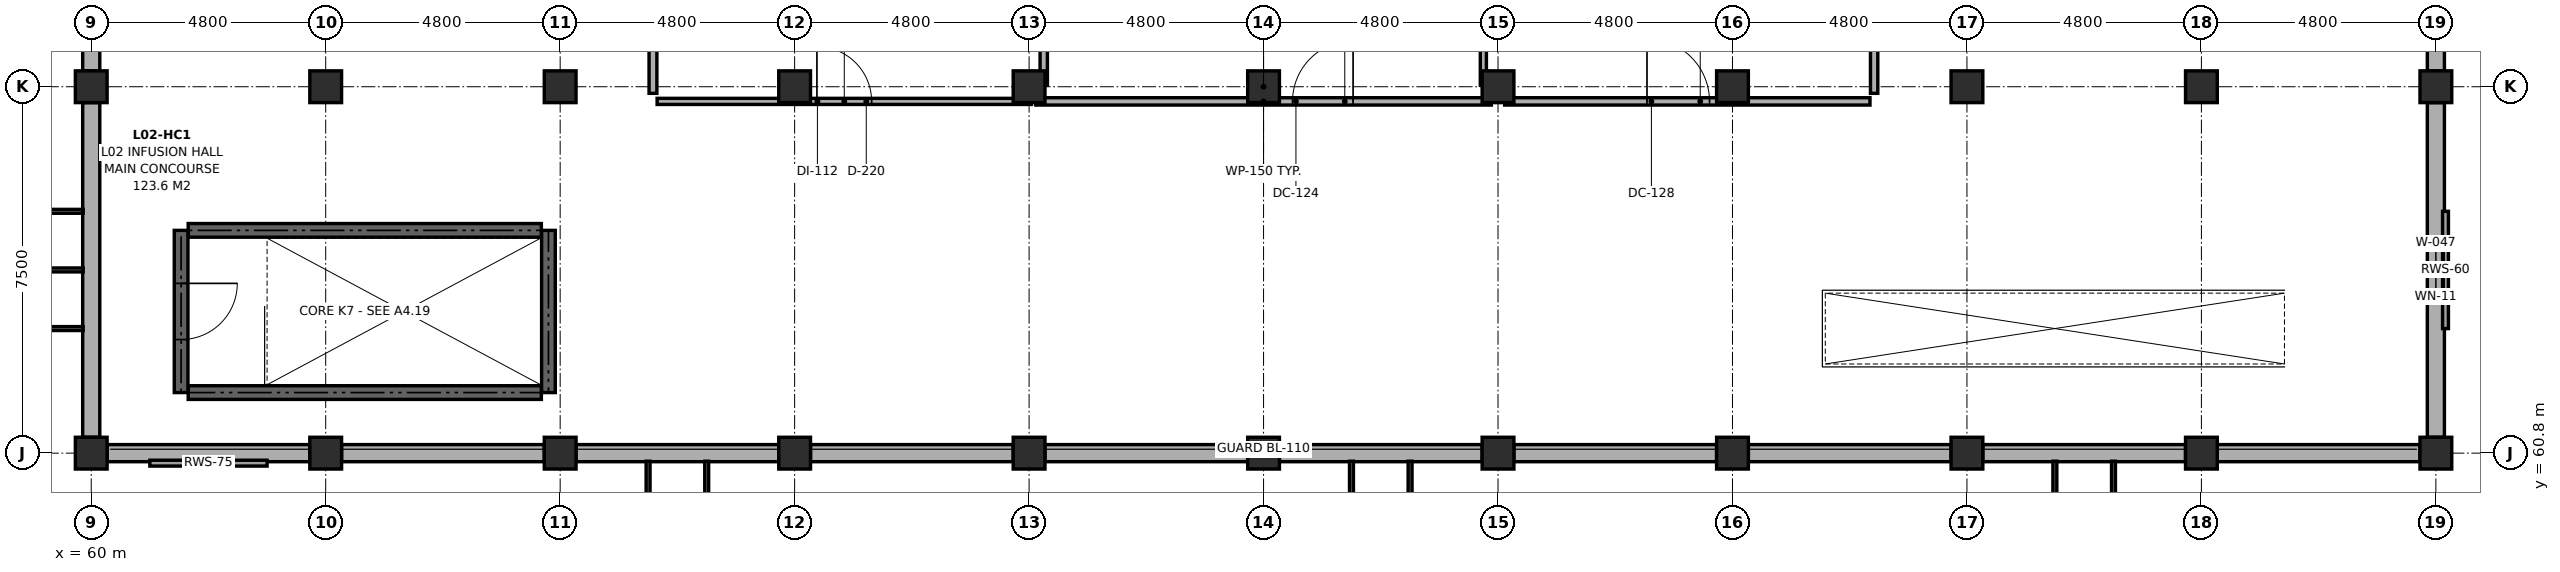
"""IFC4 building model, lengths in metres.
Left out: names, types, materials, properties, quantities, classifications, styles, units other than length and angle.
Written with IfcOpenShell. Run it as: python <this file> out.ifc"""

import sys

from ifc_helpers import new_model, si_unit, direction, frame, frame_2d, origin, origin_2d, place, context, subcontext, project, spatial, rectangle, circle, extrude, element, fill, save


model = new_model("IFC4")
c1 = context("Model", 3, precision=1e-05, world=origin(), true_north=direction((0.0, 1.0)))
c2 = subcontext(c1, "Body", "Model", "MODEL_VIEW")
j1 = project(units=[si_unit("LENGTHUNIT", "METRE"), si_unit("PLANEANGLEUNIT", "RADIAN")], contexts=[c1])
p1 = place(None, origin())
s1 = spatial("IfcSite", under=j1, at=p1, CompositionType="ELEMENT")
p2 = place(p1, origin())
s2 = spatial("IfcBuilding", under=s1, at=p2, CompositionType="ELEMENT")
p3 = place(p2, frame((0.0, 0.0, 9.5)))
s3 = spatial("IfcBuildingStorey", under=s2, at=p3, CompositionType="ELEMENT", Elevation=9.5)
p4 = place(p3, frame((60.0, 60.8, 0.0), z_axis=(0.0, 0.0, 1.0), x_axis=(1.0, 0.0, 0.0)))
e1 = element("IfcColumn", 1, at=p4, inside=s3, PredefinedType="COLUMN", context=c2, shape_type="SweptSolid", body=[
    extrude(circle(Radius=0.325, at=origin_2d()), origin(), (0.0, 0.0, 1.0), 3.45),
])
p5 = place(p3, frame((60.0, 68.3, 0.0), z_axis=(0.0, 0.0, 1.0), x_axis=(1.0, 0.0, 0.0)))
e2 = element("IfcColumn", 2, at=p5, inside=s3, PredefinedType="COLUMN", context=c2, shape_type="SweptSolid", body=[
    extrude(circle(Radius=0.325, at=origin_2d()), origin(), (0.0, 0.0, 1.0), 6.0),
])
p6 = place(p3, frame((64.8, 60.8, 0.0), z_axis=(0.0, 0.0, 1.0), x_axis=(1.0, 0.0, 0.0)))
e3 = element("IfcColumn", 3, at=p6, inside=s3, PredefinedType="COLUMN", context=c2, shape_type="SweptSolid", body=[
    extrude(circle(Radius=0.325, at=origin_2d()), origin(), (0.0, 0.0, 1.0), 3.45),
])
p7 = place(p3, frame((64.8, 68.3, 0.0), z_axis=(0.0, 0.0, 1.0), x_axis=(1.0, 0.0, 0.0)))
e4 = element("IfcColumn", 4, at=p7, inside=s3, PredefinedType="COLUMN", context=c2, shape_type="SweptSolid", body=[
    extrude(circle(Radius=0.325, at=origin_2d()), origin(), (0.0, 0.0, 1.0), 6.0),
])
p8 = place(p3, frame((69.6, 60.8, 0.0), z_axis=(0.0, 0.0, 1.0), x_axis=(1.0, 0.0, 0.0)))
e5 = element("IfcColumn", 5, at=p8, inside=s3, PredefinedType="COLUMN", context=c2, shape_type="SweptSolid", body=[
    extrude(circle(Radius=0.325, at=origin_2d()), origin(), (0.0, 0.0, 1.0), 3.45),
])
p9 = place(p3, frame((69.6, 68.3, 0.0), z_axis=(0.0, 0.0, 1.0), x_axis=(1.0, 0.0, 0.0)))
e6 = element("IfcColumn", 6, at=p9, inside=s3, PredefinedType="COLUMN", context=c2, shape_type="SweptSolid", body=[
    extrude(circle(Radius=0.325, at=origin_2d()), origin(), (0.0, 0.0, 1.0), 6.0),
])
p10 = place(p3, frame((74.4, 60.8, 0.0), z_axis=(0.0, 0.0, 1.0), x_axis=(1.0, 0.0, 0.0)))
e7 = element("IfcColumn", 7, at=p10, inside=s3, PredefinedType="COLUMN", context=c2, shape_type="SweptSolid", body=[
    extrude(circle(Radius=0.325, at=origin_2d()), origin(), (0.0, 0.0, 1.0), 3.45),
])
p11 = place(p3, frame((74.4, 68.3, 0.0), z_axis=(0.0, 0.0, 1.0), x_axis=(1.0, 0.0, 0.0)))
e8 = element("IfcColumn", 8, at=p11, inside=s3, PredefinedType="COLUMN", context=c2, shape_type="SweptSolid", body=[
    extrude(circle(Radius=0.325, at=origin_2d()), origin(), (0.0, 0.0, 1.0), 6.0),
])
p12 = place(p3, frame((79.2, 60.8, 0.0), z_axis=(0.0, 0.0, 1.0), x_axis=(1.0, 0.0, 0.0)))
e9 = element("IfcColumn", 9, at=p12, inside=s3, PredefinedType="COLUMN", context=c2, shape_type="SweptSolid", body=[
    extrude(circle(Radius=0.325, at=origin_2d()), origin(), (0.0, 0.0, 1.0), 3.45),
])
p13 = place(p3, frame((79.2, 68.3, 0.0), z_axis=(0.0, 0.0, 1.0), x_axis=(1.0, 0.0, 0.0)))
e10 = element("IfcColumn", 10, at=p13, inside=s3, PredefinedType="COLUMN", context=c2, shape_type="SweptSolid", body=[
    extrude(circle(Radius=0.325, at=origin_2d()), origin(), (0.0, 0.0, 1.0), 6.0),
])
p14 = place(p3, frame((84.0, 60.8, 0.0), z_axis=(0.0, 0.0, 1.0), x_axis=(1.0, 0.0, 0.0)))
e11 = element("IfcColumn", 11, at=p14, inside=s3, PredefinedType="COLUMN", context=c2, shape_type="SweptSolid", body=[
    extrude(circle(Radius=0.325, at=origin_2d()), origin(), (0.0, 0.0, 1.0), 3.45),
])
p15 = place(p3, frame((84.0, 68.3, 0.0), z_axis=(0.0, 0.0, 1.0), x_axis=(1.0, 0.0, 0.0)))
e12 = element("IfcColumn", 12, at=p15, inside=s3, PredefinedType="COLUMN", context=c2, shape_type="SweptSolid", body=[
    extrude(circle(Radius=0.325, at=origin_2d()), origin(), (0.0, 0.0, 1.0), 6.0),
])
p16 = place(p3, frame((88.8, 60.8, 0.0), z_axis=(0.0, 0.0, 1.0), x_axis=(1.0, 0.0, 0.0)))
e13 = element("IfcColumn", 13, at=p16, inside=s3, PredefinedType="COLUMN", context=c2, shape_type="SweptSolid", body=[
    extrude(circle(Radius=0.325, at=origin_2d()), origin(), (0.0, 0.0, 1.0), 3.45),
])
p17 = place(p3, frame((88.8, 68.3, 0.0), z_axis=(0.0, 0.0, 1.0), x_axis=(1.0, 0.0, 0.0)))
e14 = element("IfcColumn", 14, at=p17, inside=s3, PredefinedType="COLUMN", context=c2, shape_type="SweptSolid", body=[
    extrude(circle(Radius=0.325, at=origin_2d()), origin(), (0.0, 0.0, 1.0), 6.0),
])
p18 = place(p3, frame((93.6, 60.8, 0.0), z_axis=(0.0, 0.0, 1.0), x_axis=(1.0, 0.0, 0.0)))
e15 = element("IfcColumn", 15, at=p18, inside=s3, PredefinedType="COLUMN", context=c2, shape_type="SweptSolid", body=[
    extrude(circle(Radius=0.325, at=origin_2d()), origin(), (0.0, 0.0, 1.0), 3.45),
])
p19 = place(p3, frame((93.6, 68.3, 0.0), z_axis=(0.0, 0.0, 1.0), x_axis=(1.0, 0.0, 0.0)))
e16 = element("IfcColumn", 16, at=p19, inside=s3, PredefinedType="COLUMN", context=c2, shape_type="SweptSolid", body=[
    extrude(circle(Radius=0.325, at=origin_2d()), origin(), (0.0, 0.0, 1.0), 6.0),
])
p20 = place(p3, frame((98.4, 60.8, 0.0), z_axis=(0.0, 0.0, 1.0), x_axis=(1.0, 0.0, 0.0)))
e17 = element("IfcColumn", 17, at=p20, inside=s3, PredefinedType="COLUMN", context=c2, shape_type="SweptSolid", body=[
    extrude(circle(Radius=0.325, at=origin_2d()), origin(), (0.0, 0.0, 1.0), 3.45),
])
p21 = place(p3, frame((98.4, 68.3, 0.0), z_axis=(0.0, 0.0, 1.0), x_axis=(1.0, 0.0, 0.0)))
e18 = element("IfcColumn", 18, at=p21, inside=s3, PredefinedType="COLUMN", context=c2, shape_type="SweptSolid", body=[
    extrude(circle(Radius=0.325, at=origin_2d()), origin(), (0.0, 0.0, 1.0), 6.0),
])
p22 = place(p3, frame((103.2, 60.8, 0.0), z_axis=(0.0, 0.0, 1.0), x_axis=(1.0, 0.0, 0.0)))
e19 = element("IfcColumn", 19, at=p22, inside=s3, PredefinedType="COLUMN", context=c2, shape_type="SweptSolid", body=[
    extrude(circle(Radius=0.325, at=origin_2d()), origin(), (0.0, 0.0, 1.0), 3.45),
])
p23 = place(p3, frame((103.2, 68.3, 0.0), z_axis=(0.0, 0.0, 1.0), x_axis=(1.0, 0.0, 0.0)))
e20 = element("IfcColumn", 20, at=p23, inside=s3, PredefinedType="COLUMN", context=c2, shape_type="SweptSolid", body=[
    extrude(circle(Radius=0.325, at=origin_2d()), origin(), (0.0, 0.0, 1.0), 6.0),
])
p24 = place(p3, frame((108.0, 60.8, 0.0), z_axis=(0.0, 0.0, 1.0), x_axis=(1.0, 0.0, 0.0)))
e21 = element("IfcColumn", 21, at=p24, inside=s3, PredefinedType="COLUMN", context=c2, shape_type="SweptSolid", body=[
    extrude(circle(Radius=0.325, at=origin_2d()), origin(), (0.0, 0.0, 1.0), 3.45),
])
p25 = place(p3, frame((108.0, 68.3, 0.0), z_axis=(0.0, 0.0, 1.0), x_axis=(1.0, 0.0, 0.0)))
e22 = element("IfcColumn", 22, at=p25, inside=s3, PredefinedType="COLUMN", context=c2, shape_type="SweptSolid", body=[
    extrude(circle(Radius=0.325, at=origin_2d()), origin(), (0.0, 0.0, 1.0), 6.0),
])
p26 = place(p3, frame((108.0, 75.475, 0.0), z_axis=(0.0, 0.0, 1.0), x_axis=(0.0, -1.0, 0.0)))
e23 = element("IfcWall", 23, at=p26, inside=s3, PredefinedType="SOLIDWALL", context=c2, shape_type="SweptSolid", body=[
    extrude(rectangle(XDim=6.85, YDim=0.35, at=frame_2d((3.425, 0.0))), origin(), (0.0, 0.0, 1.0), 3.7),
])
p27 = place(p26, frame((2.8, 0.0, 0.9)))
e24 = element("IfcOpeningElement", 24, at=p27, cuts=e23, PredefinedType="OPENING", context=c2, shape_type="SweptSolid", body=[
    extrude(rectangle(XDim=1.25, YDim=1.5, at=frame_2d((0.625, 0.75))), frame((0.0, 0.187, 0.0), z_axis=(0.0, -1.0, 0.0), x_axis=(1.0, 0.0, 0.0)), (0.0, 0.0, 1.0), 0.374),
])
p28 = place(p3, frame((108.0, 67.975, 0.0), z_axis=(0.0, 0.0, 1.0), x_axis=(0.0, -1.0, 0.0)))
e25 = element("IfcWall", 25, at=p28, inside=s3, PredefinedType="SOLIDWALL", context=c2, shape_type="SweptSolid", body=[
    extrude(rectangle(XDim=6.85, YDim=0.35, at=frame_2d((3.425, 0.0))), origin(), (0.0, 0.0, 1.0), 3.058),
])
p29 = place(p28, frame((2.8, 0.0, 0.9)))
e26 = element("IfcOpeningElement", 26, at=p29, cuts=e25, PredefinedType="OPENING", context=c2, shape_type="SweptSolid", body=[
    extrude(rectangle(XDim=1.25, YDim=1.7, at=frame_2d((0.625, 0.85))), frame((0.0, 0.187, 0.0), z_axis=(0.0, -1.0, 0.0), x_axis=(1.0, 0.0, 0.0)), (0.0, 0.0, 1.0), 0.374),
])
p30 = place(p3, frame((107.675, 60.8, 0.0), z_axis=(0.0, 0.0, 1.0), x_axis=(-1.0, 0.0, 0.0)))
e27 = element("IfcWall", 27, at=p30, inside=s3, PredefinedType="SOLIDWALL", context=c2, shape_type="SweptSolid", body=[
    extrude(rectangle(XDim=4.15, YDim=0.35, at=frame_2d((2.075, 0.0))), origin(), (0.0, 0.0, 1.0), 2.994),
])
for number, where, z_axis, x_axis in (
    (28, (102.875, 60.8, 0.0), (0.0, 0.0, 1.0), (-1.0, 0.0, 0.0)),
    (29, (98.075, 60.8, 0.0), (0.0, 0.0, 1.0), (-1.0, 0.0, 0.0)),
    (30, (93.275, 60.8, 0.0), (0.0, 0.0, 1.0), (-1.0, 0.0, 0.0)),
):
    element("IfcWall", number, at=place(p3, frame(where, z_axis=z_axis, x_axis=x_axis)), inside=s3, PredefinedType="SOLIDWALL", context=c2, shape_type="SweptSolid", body=[
        extrude(rectangle(XDim=4.15, YDim=0.35, at=frame_2d((2.075, 0.0))), origin(), (0.0, 0.0, 1.0), 2.994),
    ])
for number, where, z_axis, x_axis in (
    (31, (88.475, 60.8, 0.0), (0.0, 0.0, 1.0), (-1.0, 0.0, 0.0)),
    (32, (83.675, 60.8, 0.0), (0.0, 0.0, 1.0), (-1.0, 0.0, 0.0)),
):
    element("IfcWall", number, at=place(p3, frame(where, z_axis=z_axis, x_axis=x_axis)), inside=s3, PredefinedType="SOLIDWALL", context=c2, shape_type="SweptSolid", body=[
        extrude(rectangle(XDim=4.15, YDim=0.35, at=frame_2d((2.075, 0.0))), origin(), (0.0, 0.0, 1.0), 2.994),
    ])
for number, where, z_axis, x_axis in (
    (33, (78.875, 60.8, 0.0), (0.0, 0.0, 1.0), (-1.0, 0.0, 0.0)),
    (34, (74.075, 60.8, 0.0), (0.0, 0.0, 1.0), (-1.0, 0.0, 0.0)),
    (35, (69.275, 60.8, 0.0), (0.0, 0.0, 1.0), (-1.0, 0.0, 0.0)),
):
    element("IfcWall", number, at=place(p3, frame(where, z_axis=z_axis, x_axis=x_axis)), inside=s3, PredefinedType="SOLIDWALL", context=c2, shape_type="SweptSolid", body=[
        extrude(rectangle(XDim=4.15, YDim=0.35, at=frame_2d((2.075, 0.0))), origin(), (0.0, 0.0, 1.0), 2.994),
    ])
p31 = place(p3, frame((64.475, 60.8, 0.0), z_axis=(0.0, 0.0, 1.0), x_axis=(-1.0, 0.0, 0.0)))
e36 = element("IfcWall", 36, at=p31, inside=s3, PredefinedType="SOLIDWALL", context=c2, shape_type="SweptSolid", body=[
    extrude(rectangle(XDim=4.15, YDim=0.35, at=frame_2d((2.075, 0.0))), origin(), (0.0, 0.0, 1.0), 2.994),
])
p32 = place(p3, frame((60.0, 61.125, 0.0), z_axis=(0.0, 0.0, 1.0), x_axis=(0.0, 1.0, 0.0)))
e37 = element("IfcWall", 37, at=p32, inside=s3, PredefinedType="SOLIDWALL", context=c2, shape_type="SweptSolid", body=[
    extrude(rectangle(XDim=6.85, YDim=0.35, at=frame_2d((3.425, 0.0))), origin(), (0.0, 0.0, 1.0), 3.058),
])
p33 = place(p3, frame((60.0, 68.625, 0.0), z_axis=(0.0, 0.0, 1.0), x_axis=(0.0, 1.0, 0.0)))
e38 = element("IfcWall", 38, at=p33, inside=s3, PredefinedType="SOLIDWALL", context=c2, shape_type="SweptSolid", body=[
    extrude(rectangle(XDim=6.85, YDim=0.35, at=frame_2d((3.425, 0.0))), origin(), (0.0, 0.0, 1.0), 3.7),
])
p34 = place(p33, frame((2.8, 0.0, 0.9)))
e39 = element("IfcOpeningElement", 39, at=p34, cuts=e38, PredefinedType="OPENING", context=c2, shape_type="SweptSolid", body=[
    extrude(rectangle(XDim=1.25, YDim=1.9, at=frame_2d((0.625, 0.95))), frame((0.0, 0.187, 0.0), z_axis=(0.0, -1.0, 0.0), x_axis=(1.0, 0.0, 0.0)), (0.0, 0.0, 1.0), 0.374),
])
p35 = place(p3, frame((61.985, 62.04, 0.0), z_axis=(0.0, 0.0, 1.0), x_axis=(1.0, 0.0, 0.0)))
e40 = element("IfcWall", 40, at=p35, inside=s3, PredefinedType="SHEAR", context=c2, shape_type="SweptSolid", body=[
    extrude(rectangle(XDim=7.23, YDim=0.28, at=frame_2d((3.615, 0.0))), origin(), (0.0, 0.0, 1.0), 3.7),
])
p36 = place(p3, frame((69.36, 62.04, 0.0), z_axis=(0.0, 0.0, 1.0), x_axis=(0.0, 1.0, 0.0)))
e41 = element("IfcWall", 41, at=p36, inside=s3, PredefinedType="SHEAR", context=c2, shape_type="SweptSolid", body=[
    extrude(rectangle(XDim=3.32, YDim=0.28, at=frame_2d((1.66, 0.0))), origin(), (0.0, 0.0, 1.0), 3.7),
])
p37 = place(p3, frame((69.215, 65.36, 0.0), z_axis=(0.0, 0.0, 1.0), x_axis=(-1.0, 0.0, 0.0)))
e42 = element("IfcWall", 42, at=p37, inside=s3, PredefinedType="SHEAR", context=c2, shape_type="SweptSolid", body=[
    extrude(rectangle(XDim=7.23, YDim=0.28, at=frame_2d((3.615, 0.0))), origin(), (0.0, 0.0, 1.0), 3.7),
])
p38 = place(p3, frame((61.84, 65.36, 0.0), z_axis=(0.0, 0.0, 1.0), x_axis=(0.0, -1.0, 0.0)))
e43 = element("IfcWall", 43, at=p38, inside=s3, PredefinedType="SHEAR", context=c2, shape_type="SweptSolid", body=[
    extrude(rectangle(XDim=3.32, YDim=0.28, at=frame_2d((1.66, 0.0))), origin(), (0.0, 0.0, 1.0), 3.7),
])
p39 = place(p38, frame((1.085, 0.0, 0.0)))
e44 = element("IfcOpeningElement", 44, at=p39, cuts=e43, PredefinedType="OPENING", context=c2, shape_type="SweptSolid", body=[
    extrude(rectangle(XDim=1.15, YDim=2.15, at=frame_2d((0.575, 1.075))), frame((0.0, 0.152, 0.0), z_axis=(0.0, -1.0, 0.0), x_axis=(1.0, 0.0, 0.0)), (0.0, 0.0, 1.0), 0.304),
])
p40 = place(p3, frame((71.585, 68.0, 0.0), z_axis=(0.0, 0.0, 1.0), x_axis=(1.0, 0.0, 0.0)))
e45 = element("IfcWall", 45, at=p40, inside=s3, PredefinedType="PARTITIONING", context=c2, shape_type="SweptSolid", body=[
    extrude(rectangle(XDim=7.663, YDim=0.125, at=frame_2d((3.832, 0.0))), origin(), (0.0, 0.0, 1.0), 3.7),
])
p41 = place(p40, frame((3.271, 0.0, 0.0)))
e46 = element("IfcOpeningElement", 46, at=p41, cuts=e45, PredefinedType="OPENING", context=c2, shape_type="SweptSolid", body=[
    extrude(rectangle(XDim=1.12, YDim=2.2, at=frame_2d((0.56, 1.1))), frame((0.0, 0.074, 0.0), z_axis=(0.0, -1.0, 0.0), x_axis=(1.0, 0.0, 0.0)), (0.0, 0.0, 1.0), 0.149),
])
p42 = place(p3, frame((79.337, 68.0, 0.0), z_axis=(0.0, 0.0, 1.0), x_axis=(1.0, 0.0, 0.0)))
e47 = element("IfcWall", 47, at=p42, inside=s3, PredefinedType="PARTITIONING", context=c2, shape_type="SweptSolid", body=[
    extrude(rectangle(XDim=9.326, YDim=0.15, at=frame_2d((4.663, 0.0))), origin(), (0.0, 0.0, 1.0), 3.7),
])
p43 = place(p42, frame((5.256, 0.0, 0.0)))
e48 = element("IfcOpeningElement", 48, at=p43, cuts=e47, PredefinedType="OPENING", context=c2, shape_type="SweptSolid", body=[
    extrude(rectangle(XDim=1.24, YDim=2.2, at=frame_2d((0.62, 1.1))), frame((0.0, 0.087, 0.0), z_axis=(0.0, -1.0, 0.0), x_axis=(1.0, 0.0, 0.0)), (0.0, 0.0, 1.0), 0.174),
])
p44 = place(p3, frame((88.937, 68.0, 0.0), z_axis=(0.0, 0.0, 1.0), x_axis=(1.0, 0.0, 0.0)))
e49 = element("IfcWall", 49, at=p44, inside=s3, PredefinedType="PARTITIONING", context=c2, shape_type="SweptSolid", body=[
    extrude(rectangle(XDim=7.478, YDim=0.15, at=frame_2d((3.739, 0.0))), origin(), (0.0, 0.0, 1.0), 3.7),
])
p45 = place(p44, frame((2.913, 0.0, 0.0)))
e50 = element("IfcOpeningElement", 50, at=p45, cuts=e49, PredefinedType="OPENING", context=c2, shape_type="SweptSolid", body=[
    extrude(rectangle(XDim=1.28, YDim=2.22, at=frame_2d((0.64, 1.11))), frame((0.0, 0.087, 0.0), z_axis=(0.0, -1.0, 0.0), x_axis=(1.0, 0.0, 0.0)), (0.0, 0.0, 1.0), 0.174),
])
p46 = place(p3, frame((71.5, 68.165, 0.0), z_axis=(0.0, 0.0, 1.0), x_axis=(0.0, 1.0, 0.0)))
e51 = element("IfcWall", 51, at=p46, inside=s3, PredefinedType="PARTITIONING", context=c2, shape_type="SweptSolid", body=[
    extrude(rectangle(XDim=7.448, YDim=0.16, at=frame_2d((3.724, 0.0))), origin(), (0.0, 0.0, 1.0), 3.7),
])
p47 = place(p3, frame((79.5, 68.332, 0.0), z_axis=(0.0, 0.0, 1.0), x_axis=(0.0, 1.0, 0.0)))
e52 = element("IfcWall", 52, at=p47, inside=s3, PredefinedType="PARTITIONING", context=c2, shape_type="SweptSolid", body=[
    extrude(rectangle(XDim=7.331, YDim=0.15, at=frame_2d((3.666, 0.0))), origin(), (0.0, 0.0, 1.0), 3.7),
])
p48 = place(p3, frame((88.5, 68.332, 0.0), z_axis=(0.0, 0.0, 1.0), x_axis=(0.0, 1.0, 0.0)))
e53 = element("IfcWall", 53, at=p48, inside=s3, PredefinedType="PARTITIONING", context=c2, shape_type="SweptSolid", body=[
    extrude(rectangle(XDim=7.176, YDim=0.125, at=frame_2d((3.588, 0.0))), origin(), (0.0, 0.0, 1.0), 3.7),
])
p49 = place(p3, frame((96.5, 68.165, 0.0), z_axis=(0.0, 0.0, 1.0), x_axis=(0.0, 1.0, 0.0)))
e54 = element("IfcWall", 54, at=p49, inside=s3, PredefinedType="PARTITIONING", context=c2, shape_type="SweptSolid", body=[
    extrude(rectangle(XDim=7.448, YDim=0.15, at=frame_2d((3.724, 0.0))), origin(), (0.0, 0.0, 1.0), 3.7),
])
p50 = place(p29, origin())
e55 = element("IfcWindow", 55, at=p50, inside=s3, PartitioningType="SINGLE_PANEL", PredefinedType="WINDOW", context=c2, shape_type="SweptSolid", body=[
    extrude(rectangle(XDim=1.25, YDim=1.7, at=frame_2d((0.625, 0.85))), frame((0.0, 0.03, 0.0), z_axis=(0.0, -1.0, 0.0), x_axis=(1.0, 0.0, 0.0)), (0.0, 0.0, 1.0), 0.06),
])
fill(e26, e55)
p51 = place(p39, origin())
e56 = element("IfcDoor", 56, at=p51, inside=s3, OperationType="SINGLE_SWING_LEFT", PredefinedType="DOOR", context=c2, shape_type="SweptSolid", body=[
    extrude(rectangle(XDim=1.15, YDim=2.15, at=frame_2d((0.575, 1.075))), frame((0.0, 0.025, 0.0), z_axis=(0.0, -1.0, 0.0), x_axis=(1.0, 0.0, 0.0)), (0.0, 0.0, 1.0), 0.05),
])
fill(e44, e56)
p52 = place(p41, origin())
e57 = element("IfcDoor", 57, at=p52, inside=s3, OperationType="SINGLE_SWING_LEFT", PredefinedType="DOOR", context=c2, shape_type="SweptSolid", body=[
    extrude(rectangle(XDim=1.12, YDim=2.2, at=frame_2d((0.56, 1.1))), frame((0.0, 0.025, 0.0), z_axis=(0.0, -1.0, 0.0), x_axis=(1.0, 0.0, 0.0)), (0.0, 0.0, 1.0), 0.05),
])
fill(e46, e57)
p53 = place(p43, origin())
e58 = element("IfcDoor", 58, at=p53, inside=s3, OperationType="SINGLE_SWING_RIGHT", PredefinedType="DOOR", context=c2, shape_type="SweptSolid", body=[
    extrude(rectangle(XDim=1.24, YDim=2.2, at=frame_2d((0.62, 1.1))), frame((0.0, 0.025, 0.0), z_axis=(0.0, -1.0, 0.0), x_axis=(1.0, 0.0, 0.0)), (0.0, 0.0, 1.0), 0.05),
])
fill(e48, e58)
p54 = place(p45, origin())
e59 = element("IfcDoor", 59, at=p54, inside=s3, OperationType="SINGLE_SWING_LEFT", PredefinedType="DOOR", context=c2, shape_type="SweptSolid", body=[
    extrude(rectangle(XDim=1.28, YDim=2.22, at=frame_2d((0.64, 1.11))), frame((0.0, 0.025, 0.0), z_axis=(0.0, -1.0, 0.0), x_axis=(1.0, 0.0, 0.0)), (0.0, 0.0, 1.0), 0.05),
])
fill(e50, e59)
save(model, sys.argv[1])
